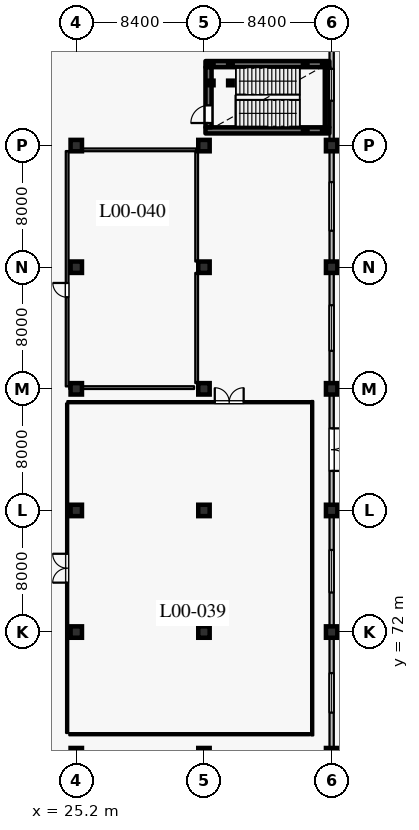
"""IFC4 building model, lengths in metres.
Left out: names, types, materials, properties, quantities, classifications, styles, units other than length and angle.
Written with IfcOpenShell. Run it as: python <this file> out.ifc"""

import sys

from ifc_helpers import new_model, si_unit, direction, frame, frame_2d, origin, origin_2d, place, context, subcontext, project, spatial, rectangle, hollow_rectangle, extrude, element, fill, save


model = new_model("IFC4")
c1 = context("Model", 3, precision=1e-05, world=origin(), true_north=direction((0.0, 1.0)))
c2 = subcontext(c1, "Body", "Model", "MODEL_VIEW")
j1 = project(units=[si_unit("LENGTHUNIT", "METRE"), si_unit("PLANEANGLEUNIT", "RADIAN")], contexts=[c1])
p1 = place(None, origin())
s1 = spatial("IfcSite", under=j1, at=p1, CompositionType="ELEMENT")
p2 = place(p1, origin())
s2 = spatial("IfcBuilding", under=s1, at=p2, CompositionType="ELEMENT")
p3 = place(p2, origin())
s3 = spatial("IfcBuildingStorey", under=s2, at=p3, CompositionType="ELEMENT", Elevation=0.0)
for number, where, z_axis, x_axis in (
    (1, (25.2, 64.0, 0.0), (0.0, 0.0, 1.0), (1.0, 0.0, 0.0)),
    (2, (25.2, 72.0, 0.0), (0.0, 0.0, 1.0), (1.0, 0.0, 0.0)),
    (3, (25.2, 80.0, 0.0), (0.0, 0.0, 1.0), (1.0, 0.0, 0.0)),
    (4, (25.2, 88.0, 0.0), (0.0, 0.0, 1.0), (1.0, 0.0, 0.0)),
    (5, (25.2, 96.0, 0.0), (0.0, 0.0, 1.0), (1.0, 0.0, 0.0)),
    (6, (25.2, 104.0, 0.0), (0.0, 0.0, 1.0), (1.0, 0.0, 0.0)),
    (7, (33.6, 64.0, 0.0), (0.0, 0.0, 1.0), (1.0, 0.0, 0.0)),
    (8, (33.6, 72.0, 0.0), (0.0, 0.0, 1.0), (1.0, 0.0, 0.0)),
    (9, (33.6, 80.0, 0.0), (0.0, 0.0, 1.0), (1.0, 0.0, 0.0)),
    (10, (33.6, 88.0, 0.0), (0.0, 0.0, 1.0), (1.0, 0.0, 0.0)),
    (11, (33.6, 96.0, 0.0), (0.0, 0.0, 1.0), (1.0, 0.0, 0.0)),
    (12, (33.6, 104.0, 0.0), (0.0, 0.0, 1.0), (1.0, 0.0, 0.0)),
    (13, (42.0, 64.0, 0.0), (0.0, 0.0, 1.0), (1.0, 0.0, 0.0)),
    (14, (42.0, 72.0, 0.0), (0.0, 0.0, 1.0), (1.0, 0.0, 0.0)),
    (15, (42.0, 80.0, 0.0), (0.0, 0.0, 1.0), (1.0, 0.0, 0.0)),
    (16, (42.0, 88.0, 0.0), (0.0, 0.0, 1.0), (1.0, 0.0, 0.0)),
    (17, (42.0, 96.0, 0.0), (0.0, 0.0, 1.0), (1.0, 0.0, 0.0)),
    (18, (42.0, 104.0, 0.0), (0.0, 0.0, 1.0), (1.0, 0.0, 0.0)),
):
    element("IfcColumn", number, at=place(p3, frame(where, z_axis=z_axis, x_axis=x_axis)), inside=s3, PredefinedType="COLUMN", context=c2, shape_type="SweptSolid", body=[
        extrude(rectangle(XDim=0.75, YDim=0.75, at=origin_2d()), origin(), (0.0, 0.0, 1.0), 6.0),
    ])
p4 = place(p3, frame((42.0, 71.625, 0.0), z_axis=(0.0, 0.0, 1.0), x_axis=(0.0, -1.0, 0.0)))
e19 = element("IfcWall", 19, at=p4, inside=s3, PredefinedType="SOLIDWALL", context=c2, shape_type="SweptSolid", body=[
    extrude(rectangle(XDim=7.25, YDim=0.28, at=frame_2d((3.625, 0.0))), origin(), (0.0, 0.0, 1.0), 5.0),
])
p5 = place(p4, frame((2.325, 0.0, 1.0)))
e20 = element("IfcOpeningElement", 20, at=p5, cuts=e19, PredefinedType="OPENING", context=c2, shape_type="SweptSolid", body=[
    extrude(rectangle(XDim=2.6, YDim=1.85, at=frame_2d((1.3, 0.925))), frame((0.0, 0.15, 0.0), z_axis=(0.0, -1.0, 0.0), x_axis=(1.0, 0.0, 0.0)), (0.0, 0.0, 1.0), 0.3),
])
p6 = place(p3, frame((42.0, 79.625, 0.0), z_axis=(0.0, 0.0, 1.0), x_axis=(0.0, -1.0, 0.0)))
e21 = element("IfcWall", 21, at=p6, inside=s3, PredefinedType="SOLIDWALL", context=c2, shape_type="SweptSolid", body=[
    extrude(rectangle(XDim=7.25, YDim=0.28, at=frame_2d((3.625, 0.0))), origin(), (0.0, 0.0, 1.0), 5.0),
])
p7 = place(p6, frame((2.225, 0.0, 1.0)))
e22 = element("IfcOpeningElement", 22, at=p7, cuts=e21, PredefinedType="OPENING", context=c2, shape_type="SweptSolid", body=[
    extrude(rectangle(XDim=2.8, YDim=1.95, at=frame_2d((1.4, 0.975))), frame((0.0, 0.15, 0.0), z_axis=(0.0, -1.0, 0.0), x_axis=(1.0, 0.0, 0.0)), (0.0, 0.0, 1.0), 0.3),
])
p8 = place(p3, frame((42.0, 87.625, 0.0), z_axis=(0.0, 0.0, 1.0), x_axis=(0.0, -1.0, 0.0)))
e23 = element("IfcWall", 23, at=p8, inside=s3, PredefinedType="SOLIDWALL", context=c2, shape_type="SweptSolid", body=[
    extrude(rectangle(XDim=7.25, YDim=0.28, at=frame_2d((3.625, 0.0))), origin(), (0.0, 0.0, 1.0), 5.0),
])
p9 = place(p8, frame((2.225, 0.0, 0.0)))
e24 = element("IfcOpeningElement", 24, at=p9, cuts=e23, PredefinedType="OPENING", context=c2, shape_type="SweptSolid", body=[
    extrude(rectangle(XDim=2.8, YDim=2.8, at=frame_2d((1.4, 1.4))), frame((0.0, 0.15, 0.0), z_axis=(0.0, -1.0, 0.0), x_axis=(1.0, 0.0, 0.0)), (0.0, 0.0, 1.0), 0.3),
])
p10 = place(p3, frame((42.0, 95.625, 0.0), z_axis=(0.0, 0.0, 1.0), x_axis=(0.0, -1.0, 0.0)))
e25 = element("IfcWall", 25, at=p10, inside=s3, PredefinedType="SOLIDWALL", context=c2, shape_type="SweptSolid", body=[
    extrude(rectangle(XDim=7.25, YDim=0.28, at=frame_2d((3.625, 0.0))), origin(), (0.0, 0.0, 1.0), 5.0),
])
p11 = place(p10, frame((2.125, 0.0, 1.0)))
e26 = element("IfcOpeningElement", 26, at=p11, cuts=e25, PredefinedType="OPENING", context=c2, shape_type="SweptSolid", body=[
    extrude(rectangle(XDim=3.0, YDim=2.2, at=frame_2d((1.5, 1.1))), frame((0.0, 0.15, 0.0), z_axis=(0.0, -1.0, 0.0), x_axis=(1.0, 0.0, 0.0)), (0.0, 0.0, 1.0), 0.3),
])
p12 = place(p3, frame((42.0, 103.625, 0.0), z_axis=(0.0, 0.0, 1.0), x_axis=(0.0, -1.0, 0.0)))
e27 = element("IfcWall", 27, at=p12, inside=s3, PredefinedType="SOLIDWALL", context=c2, shape_type="SweptSolid", body=[
    extrude(rectangle(XDim=7.25, YDim=0.28, at=frame_2d((3.625, 0.0))), origin(), (0.0, 0.0, 1.0), 5.0),
])
p13 = place(p12, frame((2.025, 0.0, 1.0)))
e28 = element("IfcOpeningElement", 28, at=p13, cuts=e27, PredefinedType="OPENING", context=c2, shape_type="SweptSolid", body=[
    extrude(rectangle(XDim=3.2, YDim=2.4, at=frame_2d((1.6, 1.2))), frame((0.0, 0.15, 0.0), z_axis=(0.0, -1.0, 0.0), x_axis=(1.0, 0.0, 0.0)), (0.0, 0.0, 1.0), 0.3),
])
p14 = place(p3, frame((42.0, 111.625, 0.0), z_axis=(0.0, 0.0, 1.0), x_axis=(0.0, -1.0, 0.0)))
e29 = element("IfcWall", 29, at=p14, inside=s3, PredefinedType="SOLIDWALL", context=c2, shape_type="SweptSolid", body=[
    extrude(rectangle(XDim=7.25, YDim=0.28, at=frame_2d((3.625, 0.0))), origin(), (0.0, 0.0, 1.0), 5.0),
])
p15 = place(p14, frame((2.575, 0.0, 1.0)))
e30 = element("IfcOpeningElement", 30, at=p15, cuts=e29, PredefinedType="OPENING", context=c2, shape_type="SweptSolid", body=[
    extrude(rectangle(XDim=2.1, YDim=1.1, at=frame_2d((1.05, 0.55))), frame((0.0, 0.15, 0.0), z_axis=(0.0, -1.0, 0.0), x_axis=(1.0, 0.0, 0.0)), (0.0, 0.0, 1.0), 0.3),
])
p16 = place(p3, frame((33.7, 105.0, 0.0), z_axis=(0.0, 0.0, 1.0), x_axis=(1.0, 0.0, 0.0)))
e31 = element("IfcWall", 31, at=p16, inside=s3, PredefinedType="SHEAR", context=c2, shape_type="SweptSolid", body=[
    extrude(rectangle(XDim=8.15, YDim=0.4, at=frame_2d((4.075, 0.0))), origin(), (0.0, 0.0, 1.0), 5.675),
])
p17 = place(p3, frame((41.7, 105.205, 0.0), z_axis=(0.0, 0.0, 1.0), x_axis=(0.0, 1.0, 0.0)))
e32 = element("IfcWall", 32, at=p17, inside=s3, PredefinedType="SHEAR", context=c2, shape_type="SweptSolid", body=[
    extrude(rectangle(XDim=3.95, YDim=0.3, at=frame_2d((1.975, 0.0))), origin(), (0.0, 0.0, 1.0), 5.675),
])
p18 = place(p3, frame((33.7, 109.36, 0.0), z_axis=(0.0, 0.0, 1.0), x_axis=(1.0, 0.0, 0.0)))
e33 = element("IfcWall", 33, at=p18, inside=s3, PredefinedType="SHEAR", context=c2, shape_type="SweptSolid", body=[
    extrude(rectangle(XDim=8.15, YDim=0.4, at=frame_2d((4.075, 0.0))), origin(), (0.0, 0.0, 1.0), 5.675),
])
p19 = place(p3, frame((33.9, 105.205, 0.0), z_axis=(0.0, 0.0, 1.0), x_axis=(0.0, 1.0, 0.0)))
e34 = element("IfcWall", 34, at=p19, inside=s3, PredefinedType="SHEAR", context=c2, shape_type="SweptSolid", body=[
    extrude(rectangle(XDim=3.95, YDim=0.4, at=frame_2d((1.975, 0.0))), origin(), (0.0, 0.0, 1.0), 5.675),
])
p20 = place(p19, frame((0.28, 0.0, 0.0)))
e35 = element("IfcOpeningElement", 35, at=p20, cuts=e34, PredefinedType="OPENING", context=c2, shape_type="SweptSolid", body=[
    extrude(rectangle(XDim=1.16, YDim=2.2, at=frame_2d((0.58, 1.1))), frame((0.0, 0.21, 0.0), z_axis=(0.0, -1.0, 0.0), x_axis=(1.0, 0.0, 0.0)), (0.0, 0.0, 1.0), 0.42),
])
for number, where, z_axis, x_axis in (
    (36, (34.08, 108.12, 0.0), (0.0, 0.0, 1.0), (1.0, 0.0, 0.0)),
    (37, (34.08, 109.36, 0.0), (0.0, 0.0, 1.0), (1.0, 0.0, 0.0)),
    (38, (35.34, 108.12, 0.0), (0.0, 0.0, 1.0), (1.0, 0.0, 0.0)),
    (39, (35.34, 109.36, 0.0), (0.0, 0.0, 1.0), (1.0, 0.0, 0.0)),
):
    element("IfcColumn", number, at=place(p3, frame(where, z_axis=z_axis, x_axis=x_axis)), inside=s3, PredefinedType="COLUMN", context=c2, shape_type="SweptSolid", body=[
        extrude(hollow_rectangle(XDim=0.3, YDim=0.3, WallThickness=0.012, at=origin_2d()), origin(), (0.0, 0.0, 1.0), 5.82),
    ])
for number, where, z_axis, x_axis in (
    (40, (40.26, 105.0, -2.7), (0.0, 0.0, 1.0), (1.0, 0.0, 0.0)),
    (41, (40.26, 109.36, -2.7), (0.0, 0.0, 1.0), (1.0, 0.0, 0.0)),
    (42, (41.52, 105.0, -2.7), (0.0, 0.0, 1.0), (1.0, 0.0, 0.0)),
    (43, (41.52, 109.36, -2.7), (0.0, 0.0, 1.0), (1.0, 0.0, 0.0)),
):
    element("IfcColumn", number, at=place(p3, frame(where, z_axis=z_axis, x_axis=x_axis)), inside=s3, PredefinedType="COLUMN", context=c2, shape_type="SweptSolid", body=[
        extrude(hollow_rectangle(XDim=0.3, YDim=0.3, WallThickness=0.012, at=origin_2d()), origin(), (0.0, 0.0, 1.0), 5.52),
    ])
p21 = place(p3, frame((24.6, 65.36, 0.0), z_axis=(0.0, 0.0, 1.0), x_axis=(0.0, 1.0, 0.0)))
e44 = element("IfcWall", 44, at=p21, inside=s3, PredefinedType="PARTITIONING", context=c2, shape_type="SweptSolid", body=[
    extrude(rectangle(XDim=21.68, YDim=0.14, at=frame_2d((10.84, 0.0))), origin(), (0.0, 0.0, 1.0), 5.675),
])
p22 = place(p21, frame((9.89, 0.0, 0.0)))
e45 = element("IfcOpeningElement", 45, at=p22, cuts=e44, PredefinedType="OPENING", context=c2, shape_type="SweptSolid", body=[
    extrude(rectangle(XDim=1.9, YDim=2.4, at=frame_2d((0.95, 1.2))), frame((0.0, 0.08, 0.0), z_axis=(0.0, -1.0, 0.0), x_axis=(1.0, 0.0, 0.0)), (0.0, 0.0, 1.0), 0.16),
])
p23 = place(p3, frame((24.74, 65.28, 0.0), z_axis=(0.0, 0.0, 1.0), x_axis=(1.0, 0.0, 0.0)))
e46 = element("IfcWall", 46, at=p23, inside=s3, PredefinedType="PARTITIONING", context=c2, shape_type="SweptSolid", body=[
    extrude(rectangle(XDim=15.81, YDim=0.14, at=frame_2d((7.905, 0.0))), origin(), (0.0, 0.0, 1.0), 5.675),
])
p24 = place(p3, frame((24.6, 88.16, 0.0), z_axis=(0.0, 0.0, 1.0), x_axis=(0.0, 1.0, 0.0)))
e47 = element("IfcWall", 47, at=p24, inside=s3, PredefinedType="PARTITIONING", context=c2, shape_type="SweptSolid", body=[
    extrude(rectangle(XDim=15.48, YDim=0.18, at=frame_2d((7.74, 0.0))), origin(), (0.0, 0.0, 1.0), 5.675),
])
p25 = place(p24, frame((5.864, 0.0, 0.0)))
e48 = element("IfcOpeningElement", 48, at=p25, cuts=e47, PredefinedType="OPENING", context=c2, shape_type="SweptSolid", body=[
    extrude(rectangle(XDim=0.94, YDim=2.15, at=frame_2d((0.47, 1.075))), frame((0.0, 0.1, 0.0), z_axis=(0.0, -1.0, 0.0), x_axis=(1.0, 0.0, 0.0)), (0.0, 0.0, 1.0), 0.2),
])
p26 = place(p3, frame((24.74, 88.08, 0.0), z_axis=(0.0, 0.0, 1.0), x_axis=(1.0, 0.0, 0.0)))
e49 = element("IfcWall", 49, at=p26, inside=s3, PredefinedType="PARTITIONING", context=c2, shape_type="SweptSolid", body=[
    extrude(rectangle(XDim=8.21, YDim=0.18, at=frame_2d((4.105, 0.0))), origin(), (0.0, 0.0, 1.0), 4.85),
])
p27 = place(p3, frame((40.72, 65.2, 0.0), z_axis=(0.0, 0.0, 1.0), x_axis=(0.0, 1.0, 0.0)))
e50 = element("IfcWall", 50, at=p27, inside=s3, PredefinedType="PARTITIONING", context=c2, shape_type="SweptSolid", body=[
    extrude(rectangle(XDim=22.0, YDim=0.14, at=frame_2d((11.0, 0.0))), origin(), (0.0, 0.0, 1.0), 5.675),
])
p28 = place(p3, frame((24.612, 87.12, 0.0), z_axis=(0.0, 0.0, 1.0), x_axis=(1.0, 0.0, 0.0)))
e51 = element("IfcWall", 51, at=p28, inside=s3, PredefinedType="PARTITIONING", context=c2, shape_type="SweptSolid", body=[
    extrude(rectangle(XDim=16.038, YDim=0.14, at=frame_2d((8.019, 0.0))), origin(), (0.0, 0.0, 1.0), 5.675),
])
p29 = place(p28, frame((9.7, 0.0, 0.0)))
e52 = element("IfcOpeningElement", 52, at=p29, cuts=e51, PredefinedType="OPENING", context=c2, shape_type="SweptSolid", body=[
    extrude(rectangle(XDim=1.9, YDim=2.4, at=frame_2d((0.95, 1.2))), frame((0.0, 0.08, 0.0), z_axis=(0.0, -1.0, 0.0), x_axis=(1.0, 0.0, 0.0)), (0.0, 0.0, 1.0), 0.16),
])
for number, where, z_axis, x_axis in (
    (53, (33.12, 88.374, 0.0), (0.0, 0.0, 1.0), (0.0, 1.0, 0.0)),
    (54, (33.12, 96.374, 0.0), (0.0, 0.0, 1.0), (0.0, 1.0, 0.0)),
):
    element("IfcWall", number, at=place(p3, frame(where, z_axis=z_axis, x_axis=x_axis)), inside=s3, PredefinedType="PARTITIONING", context=c2, shape_type="SweptSolid", body=[
        extrude(rectangle(XDim=7.252, YDim=0.18, at=frame_2d((3.626, 0.0))), origin(), (0.0, 0.0, 1.0), 5.675),
    ])
p30 = place(p3, frame((25.575, 103.72, 0.0), z_axis=(0.0, 0.0, 1.0), x_axis=(1.0, 0.0, 0.0)))
e55 = element("IfcWall", 55, at=p30, inside=s3, PredefinedType="PARTITIONING", context=c2, shape_type="SweptSolid", body=[
    extrude(rectangle(XDim=7.525, YDim=0.18, at=frame_2d((3.763, 0.0))), origin(), (0.0, 0.0, 1.0), 4.85),
])
p31 = place(p5, origin())
e56 = element("IfcWindow", 56, at=p31, inside=s3, PartitioningType="DOUBLE_PANEL_VERTICAL", PredefinedType="WINDOW", context=c2, shape_type="SweptSolid", body=[
    extrude(rectangle(XDim=2.6, YDim=1.85, at=frame_2d((1.3, 0.925))), frame((0.0, 0.03, 0.0), z_axis=(0.0, -1.0, 0.0), x_axis=(1.0, 0.0, 0.0)), (0.0, 0.0, 1.0), 0.06),
])
fill(e20, e56)
p32 = place(p7, origin())
e57 = element("IfcWindow", 57, at=p32, inside=s3, PartitioningType="DOUBLE_PANEL_VERTICAL", PredefinedType="WINDOW", context=c2, shape_type="SweptSolid", body=[
    extrude(rectangle(XDim=2.8, YDim=1.95, at=frame_2d((1.4, 0.975))), frame((0.0, 0.03, 0.0), z_axis=(0.0, -1.0, 0.0), x_axis=(1.0, 0.0, 0.0)), (0.0, 0.0, 1.0), 0.06),
])
fill(e22, e57)
p33 = place(p9, origin())
e58 = element("IfcDoor", 58, at=p33, inside=s3, OperationType="DOUBLE_DOOR_SINGLE_SWING", PredefinedType="DOOR", context=c2, shape_type="SweptSolid", body=[
    extrude(rectangle(XDim=2.8, YDim=2.8, at=frame_2d((1.4, 1.4))), frame((0.0, 0.025, 0.0), z_axis=(0.0, -1.0, 0.0), x_axis=(1.0, 0.0, 0.0)), (0.0, 0.0, 1.0), 0.05),
])
fill(e24, e58)
p34 = place(p11, origin())
e59 = element("IfcWindow", 59, at=p34, inside=s3, PartitioningType="DOUBLE_PANEL_VERTICAL", PredefinedType="WINDOW", context=c2, shape_type="SweptSolid", body=[
    extrude(rectangle(XDim=3.0, YDim=2.2, at=frame_2d((1.5, 1.1))), frame((0.0, 0.03, 0.0), z_axis=(0.0, -1.0, 0.0), x_axis=(1.0, 0.0, 0.0)), (0.0, 0.0, 1.0), 0.06),
])
fill(e26, e59)
p35 = place(p13, origin())
e60 = element("IfcWindow", 60, at=p35, inside=s3, PartitioningType="DOUBLE_PANEL_VERTICAL", PredefinedType="WINDOW", context=c2, shape_type="SweptSolid", body=[
    extrude(rectangle(XDim=3.2, YDim=2.4, at=frame_2d((1.6, 1.2))), frame((0.0, 0.03, 0.0), z_axis=(0.0, -1.0, 0.0), x_axis=(1.0, 0.0, 0.0)), (0.0, 0.0, 1.0), 0.06),
])
fill(e28, e60)
p36 = place(p15, origin())
e61 = element("IfcWindow", 61, at=p36, inside=s3, PartitioningType="DOUBLE_PANEL_VERTICAL", PredefinedType="WINDOW", context=c2, shape_type="SweptSolid", body=[
    extrude(rectangle(XDim=2.1, YDim=1.1, at=frame_2d((1.05, 0.55))), frame((0.0, 0.03, 0.0), z_axis=(0.0, -1.0, 0.0), x_axis=(1.0, 0.0, 0.0)), (0.0, 0.0, 1.0), 0.06),
])
fill(e30, e61)
p37 = place(p20, origin())
e62 = element("IfcDoor", 62, at=p37, inside=s3, OperationType="SINGLE_SWING_LEFT", PredefinedType="DOOR", context=c2, shape_type="SweptSolid", body=[
    extrude(rectangle(XDim=1.16, YDim=2.2, at=frame_2d((0.58, 1.1))), frame((0.0, 0.025, 0.0), z_axis=(0.0, -1.0, 0.0), x_axis=(1.0, 0.0, 0.0)), (0.0, 0.0, 1.0), 0.05),
])
fill(e35, e62)
p38 = place(p22, origin())
e63 = element("IfcDoor", 63, at=p38, inside=s3, OperationType="DOUBLE_DOOR_SINGLE_SWING", PredefinedType="DOOR", context=c2, shape_type="SweptSolid", body=[
    extrude(rectangle(XDim=1.9, YDim=2.4, at=frame_2d((0.95, 1.2))), frame((0.0, 0.025, 0.0), z_axis=(0.0, -1.0, 0.0), x_axis=(1.0, 0.0, 0.0)), (0.0, 0.0, 1.0), 0.05),
])
fill(e45, e63)
p39 = place(p25, origin())
e64 = element("IfcDoor", 64, at=p39, inside=s3, OperationType="SINGLE_SWING_RIGHT", PredefinedType="DOOR", context=c2, shape_type="SweptSolid", body=[
    extrude(rectangle(XDim=0.94, YDim=2.15, at=frame_2d((0.47, 1.075))), frame((0.0, 0.025, 0.0), z_axis=(0.0, -1.0, 0.0), x_axis=(1.0, 0.0, 0.0)), (0.0, 0.0, 1.0), 0.05),
])
fill(e48, e64)
p40 = place(p29, origin())
e65 = element("IfcDoor", 65, at=p40, inside=s3, OperationType="DOUBLE_DOOR_SINGLE_SWING", PredefinedType="DOOR", context=c2, shape_type="SweptSolid", body=[
    extrude(rectangle(XDim=1.9, YDim=2.4, at=frame_2d((0.95, 1.2))), frame((0.0, 0.025, 0.0), z_axis=(0.0, -1.0, 0.0), x_axis=(1.0, 0.0, 0.0)), (0.0, 0.0, 1.0), 0.05),
])
fill(e52, e65)
save(model, sys.argv[1])
